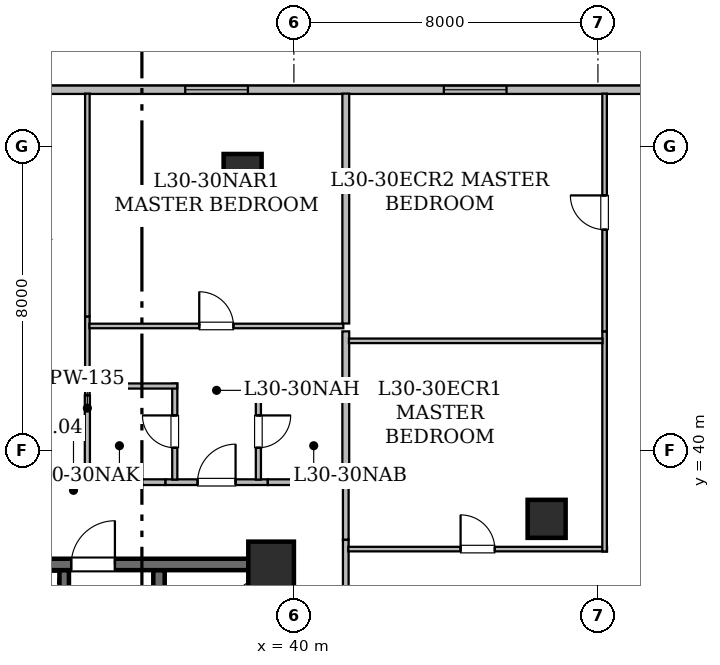
"""IFC4 building model, lengths in metres.
Left out: names, types, materials, properties, quantities, classifications, styles, units other than length and angle.
Written with IfcOpenShell. Run it as: python <this file> out.ifc"""

import sys

from ifc_helpers import new_model, si_unit, direction, frame, frame_2d, origin, origin_2d, place, context, subcontext, project, spatial, rectangle, hollow_rectangle, extrude, element, fill, save


model = new_model("IFC4")
c1 = context("Model", 3, precision=1e-05, world=origin(), true_north=direction((0.0, 1.0)))
c2 = subcontext(c1, "Body", "Model", "MODEL_VIEW")
j1 = project(units=[si_unit("LENGTHUNIT", "METRE"), si_unit("PLANEANGLEUNIT", "RADIAN")], contexts=[c1])
p1 = place(None, origin())
s1 = spatial("IfcSite", under=j1, at=p1, CompositionType="ELEMENT")
p2 = place(p1, origin())
s2 = spatial("IfcBuilding", under=s1, at=p2, CompositionType="ELEMENT")
p3 = place(p2, frame((0.0, 0.0, 120.15)))
s3 = spatial("IfcBuildingStorey", under=s2, at=p3, CompositionType="ELEMENT", Elevation=120.15)
p4 = place(p3, frame((39.4, 37.0, 0.0), z_axis=(0.0, 0.0, 1.0), x_axis=(1.0, 0.0, 0.0)))
e1 = element("IfcColumn", 1, at=p4, inside=s3, PredefinedType="COLUMN", context=c2, shape_type="SweptSolid", body=[
    extrude(hollow_rectangle(XDim=1.2, YDim=1.2, WallThickness=0.06, at=origin_2d()), origin(), (0.0, 0.0, 1.0), 3.65),
])
for number, where, z_axis, x_axis in (
    (2, (38.65, 47.3, 0.0), (0.0, 0.0, 1.0), (1.0, 0.0, 0.0)),
    (3, (46.65, 38.2, 0.0), (0.0, 0.0, 1.0), (1.0, 0.0, 0.0)),
):
    element("IfcColumn", number, at=place(p3, frame(where, z_axis=z_axis, x_axis=x_axis)), inside=s3, PredefinedType="COLUMN", context=c2, shape_type="SweptSolid", body=[
        extrude(hollow_rectangle(XDim=1.0, YDim=1.0, WallThickness=0.05, at=origin_2d()), origin(), (0.0, 0.0, 1.0), 3.65),
    ])
p5 = place(p3, frame((13.715, 49.49, 0.0), z_axis=(0.0, 0.0, 1.0), x_axis=(1.0, 0.0, 0.0)))
e4 = element("IfcWall", 4, at=p5, inside=s3, PredefinedType="STANDARD", context=c2, shape_type="SweptSolid", body=[
    extrude(rectangle(XDim=38.639, YDim=0.22, at=frame_2d((19.319, 0.0))), origin(), (0.0, 0.0, 1.0), 3.43),
])
p6 = place(p5, frame((16.16, 0.0, 0.85)))
e5 = element("IfcOpeningElement", 5, at=p6, cuts=e4, PredefinedType="OPENING", context=c2, shape_type="SweptSolid", body=[
    extrude(rectangle(XDim=1.65, YDim=1.55, at=frame_2d((0.825, 0.775))), frame((0.0, 0.12, 0.0), z_axis=(0.0, -1.0, 0.0), x_axis=(1.0, 0.0, 0.0)), (0.0, 0.0, 1.0), 0.24),
])
p7 = place(p5, frame((2.243, 0.0, 0.85)))
e6 = element("IfcOpeningElement", 6, at=p7, cuts=e4, PredefinedType="OPENING", context=c2, shape_type="SweptSolid", body=[
    extrude(rectangle(XDim=1.65, YDim=1.55, at=frame_2d((0.825, 0.775))), frame((0.0, 0.12, 0.0), z_axis=(0.0, -1.0, 0.0), x_axis=(1.0, 0.0, 0.0)), (0.0, 0.0, 1.0), 0.24),
])
p8 = place(p5, frame((11.03, 0.0, 0.85)))
e7 = element("IfcOpeningElement", 7, at=p8, cuts=e4, PredefinedType="OPENING", context=c2, shape_type="SweptSolid", body=[
    extrude(rectangle(XDim=1.65, YDim=1.55, at=frame_2d((0.825, 0.775))), frame((0.0, 0.12, 0.0), z_axis=(0.0, -1.0, 0.0), x_axis=(1.0, 0.0, 0.0)), (0.0, 0.0, 1.0), 0.24),
])
p9 = place(p5, frame((9.2, 0.0, 0.8)))
e8 = element("IfcOpeningElement", 8, at=p9, cuts=e4, PredefinedType="OPENING", context=c2, shape_type="SweptSolid", body=[
    extrude(rectangle(XDim=1.2, YDim=1.5, at=frame_2d((0.6, 0.75))), frame((0.0, 0.12, 0.0), z_axis=(0.0, -1.0, 0.0), x_axis=(1.0, 0.0, 0.0)), (0.0, 0.0, 1.0), 0.24),
])
p10 = place(p5, frame((6.175, 0.0, 0.85)))
e9 = element("IfcOpeningElement", 9, at=p10, cuts=e4, PredefinedType="OPENING", context=c2, shape_type="SweptSolid", body=[
    extrude(rectangle(XDim=1.65, YDim=1.55, at=frame_2d((0.825, 0.775))), frame((0.0, 0.12, 0.0), z_axis=(0.0, -1.0, 0.0), x_axis=(1.0, 0.0, 0.0)), (0.0, 0.0, 1.0), 0.24),
])
p11 = place(p5, frame((23.425, 0.0, 0.85)))
e10 = element("IfcOpeningElement", 10, at=p11, cuts=e4, PredefinedType="OPENING", context=c2, shape_type="SweptSolid", body=[
    extrude(rectangle(XDim=1.65, YDim=1.55, at=frame_2d((0.825, 0.775))), frame((0.0, 0.12, 0.0), z_axis=(0.0, -1.0, 0.0), x_axis=(1.0, 0.0, 0.0)), (0.0, 0.0, 1.0), 0.24),
])
p12 = place(p5, frame((30.23, 0.0, 0.85)))
e11 = element("IfcOpeningElement", 11, at=p12, cuts=e4, PredefinedType="OPENING", context=c2, shape_type="SweptSolid", body=[
    extrude(rectangle(XDim=1.65, YDim=1.55, at=frame_2d((0.825, 0.775))), frame((0.0, 0.12, 0.0), z_axis=(0.0, -1.0, 0.0), x_axis=(1.0, 0.0, 0.0)), (0.0, 0.0, 1.0), 0.24),
])
p13 = place(p5, frame((36.367, 0.0, 0.85)))
e12 = element("IfcOpeningElement", 12, at=p13, cuts=e4, PredefinedType="OPENING", context=c2, shape_type="SweptSolid", body=[
    extrude(rectangle(XDim=1.65, YDim=1.55, at=frame_2d((0.825, 0.775))), frame((0.0, 0.12, 0.0), z_axis=(0.0, -1.0, 0.0), x_axis=(1.0, 0.0, 0.0)), (0.0, 0.0, 1.0), 0.24),
])
p14 = place(p3, frame((29.0, 37.0, 0.0), z_axis=(0.0, 0.0, 1.0), x_axis=(1.0, 0.0, 0.0)))
e13 = element("IfcWall", 13, at=p14, inside=s3, PredefinedType="SHEAR", context=c2, shape_type="SweptSolid", body=[
    extrude(rectangle(XDim=10.4, YDim=0.3, at=frame_2d((5.2, 0.0))), origin(), (0.0, 0.0, 1.0), 3.43),
])
p15 = place(p14, frame((5.14, 0.0, 0.0)))
e14 = element("IfcOpeningElement", 14, at=p15, cuts=e13, PredefinedType="OPENING", context=c2, shape_type="SweptSolid", body=[
    extrude(rectangle(XDim=1.15, YDim=2.2, at=frame_2d((0.575, 1.1))), frame((0.0, 0.16, 0.0), z_axis=(0.0, -1.0, 0.0), x_axis=(1.0, 0.0, 0.0)), (0.0, 0.0, 1.0), 0.32),
])
p16 = place(p3, frame((39.4, 24.4, 0.0), z_axis=(0.0, 0.0, 1.0), x_axis=(0.0, 1.0, 0.0)))
e15 = element("IfcWall", 15, at=p16, inside=s3, PredefinedType="SHEAR", context=c2, shape_type="SweptSolid", body=[
    extrude(rectangle(XDim=12.6, YDim=0.3, at=frame_2d((6.3, 0.0))), origin(), (0.0, 0.0, 1.0), 3.43),
])
p17 = place(p3, frame((36.45, 31.35, 0.0), z_axis=(0.0, 0.0, 1.0), x_axis=(0.0, 1.0, 0.0)))
e16 = element("IfcWall", 16, at=p17, inside=s3, PredefinedType="SHEAR", context=c2, shape_type="SweptSolid", body=[
    extrude(rectangle(XDim=5.496, YDim=0.3, at=frame_2d((2.748, 0.0))), origin(), (0.0, 0.0, 1.0), 3.43),
])
p18 = place(p3, frame((33.955, 34.025, 0.0), z_axis=(0.0, 0.0, 1.0), x_axis=(0.0, 1.0, 0.0)))
e17 = element("IfcWall", 17, at=p18, inside=s3, PredefinedType="SHEAR", context=c2, shape_type="SweptSolid", body=[
    extrude(rectangle(XDim=2.821, YDim=0.25, at=frame_2d((1.411, 0.0))), origin(), (0.0, 0.0, 1.0), 3.43),
])
p19 = place(p3, frame((26.9, 39.165, 0.0), z_axis=(0.0, 0.0, 1.0), x_axis=(1.0, 0.0, 0.0)))
e18 = element("IfcWall", 18, at=p19, inside=s3, PredefinedType="STANDARD", context=c2, shape_type="SweptSolid", body=[
    extrude(rectangle(XDim=7.914, YDim=0.15, at=frame_2d((3.957, 0.0))), origin(), (0.0, 0.0, 1.0), 2.647),
])
p20 = place(p19, frame((3.486, 0.0, 0.0)))
e19 = element("IfcOpeningElement", 19, at=p20, cuts=e18, PredefinedType="OPENING", context=c2, shape_type="SweptSolid", body=[
    extrude(rectangle(XDim=0.9, YDim=2.1, at=frame_2d((0.45, 1.05))), frame((0.0, 0.085, 0.0), z_axis=(0.0, -1.0, 0.0), x_axis=(1.0, 0.0, 0.0)), (0.0, 0.0, 1.0), 0.17),
])
p21 = place(p3, frame((36.616, 39.165, 0.0), z_axis=(0.0, 0.0, 1.0), x_axis=(1.0, 0.0, 0.0)))
e20 = element("IfcWall", 20, at=p21, inside=s3, PredefinedType="STANDARD", context=c2, shape_type="SweptSolid", body=[
    extrude(rectangle(XDim=2.698, YDim=0.15, at=frame_2d((1.349, 0.0))), origin(), (0.0, 0.0, 1.0), 2.647),
])
p22 = place(p21, frame((0.849, 0.0, 0.0)))
e21 = element("IfcOpeningElement", 21, at=p22, cuts=e20, PredefinedType="OPENING", context=c2, shape_type="SweptSolid", body=[
    extrude(rectangle(XDim=1.0, YDim=2.15, at=frame_2d((0.5, 1.075))), frame((0.0, 0.085, 0.0), z_axis=(0.0, -1.0, 0.0), x_axis=(1.0, 0.0, 0.0)), (0.0, 0.0, 1.0), 0.17),
])
p23 = place(p3, frame((39.314, 39.165, 0.0), z_axis=(0.0, 0.0, 1.0), x_axis=(1.0, 0.0, 0.0)))
e22 = element("IfcWall", 22, at=p23, inside=s3, PredefinedType="STANDARD", context=c2, shape_type="SweptSolid", body=[
    extrude(rectangle(XDim=1.986, YDim=0.15, at=frame_2d((0.993, 0.0))), origin(), (0.0, 0.0, 1.0), 2.647),
])
p24 = place(p3, frame((34.814, 39.165, 0.0), z_axis=(0.0, 0.0, 1.0), x_axis=(1.0, 0.0, 0.0)))
e23 = element("IfcWall", 23, at=p24, inside=s3, PredefinedType="STANDARD", context=c2, shape_type="SweptSolid", body=[
    extrude(rectangle(XDim=1.802, YDim=0.15, at=frame_2d((0.901, 0.0))), origin(), (0.0, 0.0, 1.0), 3.43),
])
p25 = place(p3, frame((41.365, 37.653, 0.0), z_axis=(0.0, 0.0, 1.0), x_axis=(0.0, -1.0, 0.0)))
e24 = element("IfcWall", 24, at=p25, inside=s3, PredefinedType="STANDARD", context=c2, shape_type="SweptSolid", body=[
    extrude(rectangle(XDim=2.078, YDim=0.15, at=frame_2d((1.039, 0.0))), origin(), (0.0, 0.0, 1.0), 2.647),
])
p26 = place(p3, frame((41.365, 39.1, 0.0), z_axis=(0.0, 0.0, 1.0), x_axis=(0.0, -1.0, 0.0)))
e25 = element("IfcWall", 25, at=p26, inside=s3, PredefinedType="STANDARD", context=c2, shape_type="SweptSolid", body=[
    extrude(rectangle(XDim=1.447, YDim=0.15, at=frame_2d((0.724, 0.0))), origin(), (0.0, 0.0, 1.0), 3.43),
])
p27 = place(p3, frame((34.565, 43.524, 0.0), z_axis=(0.0, 0.0, 1.0), x_axis=(0.0, -1.0, 0.0)))
e26 = element("IfcWall", 26, at=p27, inside=s3, PredefinedType="PARTITIONING", context=c2, shape_type="SweptSolid", body=[
    extrude(rectangle(XDim=2.078, YDim=0.12, at=frame_2d((1.039, 0.0))), origin(), (0.0, 0.0, 1.0), 3.43),
])
p28 = place(p3, frame((34.565, 41.446, 0.0), z_axis=(0.0, 0.0, 1.0), x_axis=(0.0, -1.0, 0.0)))
e27 = element("IfcWall", 27, at=p28, inside=s3, PredefinedType="PARTITIONING", context=c2, shape_type="SweptSolid", body=[
    extrude(rectangle(XDim=2.214, YDim=0.135, at=frame_2d((1.107, 0.0))), origin(), (0.0, 0.0, 1.0), 3.43),
])
p29 = place(p3, frame((34.565, 49.388, 0.0), z_axis=(0.0, 0.0, 1.0), x_axis=(0.0, -1.0, 0.0)))
e28 = element("IfcWall", 28, at=p29, inside=s3, PredefinedType="PARTITIONING", context=c2, shape_type="SweptSolid", body=[
    extrude(rectangle(XDim=5.864, YDim=0.12, at=frame_2d((2.932, 0.0))), origin(), (0.0, 0.0, 1.0), 2.876),
])
p30 = place(p3, frame((41.3, 41.695, 0.0), z_axis=(0.0, 0.0, 1.0), x_axis=(-1.0, 0.0, 0.0)))
e29 = element("IfcWall", 29, at=p30, inside=s3, PredefinedType="PARTITIONING", context=c2, shape_type="SweptSolid", body=[
    extrude(rectangle(XDim=2.3, YDim=0.135, at=frame_2d((1.15, 0.0))), origin(), (0.0, 0.0, 1.0), 2.647),
])
p31 = place(p3, frame((39.065, 41.76, 0.0), z_axis=(0.0, 0.0, 1.0), x_axis=(0.0, -1.0, 0.0)))
e30 = element("IfcWall", 30, at=p31, inside=s3, PredefinedType="PARTITIONING", context=c2, shape_type="SweptSolid", body=[
    extrude(rectangle(XDim=2.528, YDim=0.135, at=frame_2d((1.264, 0.0))), origin(), (0.0, 0.0, 1.0), 2.647),
])
p32 = place(p31, frame((0.839, 0.0, 0.0)))
e31 = element("IfcOpeningElement", 31, at=p32, cuts=e30, PredefinedType="OPENING", context=c2, shape_type="SweptSolid", body=[
    extrude(rectangle(XDim=0.85, YDim=2.1, at=frame_2d((0.425, 1.05))), frame((0.0, 0.077, 0.0), z_axis=(0.0, -1.0, 0.0), x_axis=(1.0, 0.0, 0.0)), (0.0, 0.0, 1.0), 0.155),
])
p33 = place(p3, frame((36.865, 39.232, 0.0), z_axis=(0.0, 0.0, 1.0), x_axis=(0.0, 1.0, 0.0)))
e32 = element("IfcWall", 32, at=p33, inside=s3, PredefinedType="PARTITIONING", context=c2, shape_type="SweptSolid", body=[
    extrude(rectangle(XDim=2.528, YDim=0.135, at=frame_2d((1.264, 0.0))), origin(), (0.0, 0.0, 1.0), 3.43),
])
p34 = place(p33, frame((0.839, 0.0, 0.0)))
e33 = element("IfcOpeningElement", 33, at=p34, cuts=e32, PredefinedType="OPENING", context=c2, shape_type="SweptSolid", body=[
    extrude(rectangle(XDim=0.85, YDim=2.1, at=frame_2d((0.425, 1.05))), frame((0.0, 0.077, 0.0), z_axis=(0.0, -1.0, 0.0), x_axis=(1.0, 0.0, 0.0)), (0.0, 0.0, 1.0), 0.155),
])
p35 = place(p3, frame((36.93, 41.695, 0.0), z_axis=(0.0, 0.0, 1.0), x_axis=(-1.0, 0.0, 0.0)))
e34 = element("IfcWall", 34, at=p35, inside=s3, PredefinedType="PARTITIONING", context=c2, shape_type="SweptSolid", body=[
    extrude(rectangle(XDim=2.311, YDim=0.135, at=frame_2d((1.156, 0.0))), origin(), (0.0, 0.0, 1.0), 3.43),
])
p36 = place(p3, frame((34.619, 43.275, 0.0), z_axis=(0.0, 0.0, 1.0), x_axis=(1.0, 0.0, 0.0)))
e35 = element("IfcWall", 35, at=p36, inside=s3, PredefinedType="PARTITIONING", context=c2, shape_type="SweptSolid", body=[
    extrude(rectangle(XDim=6.681, YDim=0.12, at=frame_2d((3.341, 0.0))), origin(), (0.0, 0.0, 1.0), 2.647),
])
p37 = place(p36, frame((2.89, 0.0, 0.0)))
e36 = element("IfcOpeningElement", 36, at=p37, cuts=e35, PredefinedType="OPENING", context=c2, shape_type="SweptSolid", body=[
    extrude(rectangle(XDim=0.9, YDim=2.1, at=frame_2d((0.45, 1.05))), frame((0.0, 0.07, 0.0), z_axis=(0.0, -1.0, 0.0), x_axis=(1.0, 0.0, 0.0)), (0.0, 0.0, 1.0), 0.14),
])
p38 = place(p3, frame((41.365, 43.133, 0.0), z_axis=(0.0, 0.0, 1.0), x_axis=(0.0, -1.0, 0.0)))
e37 = element("IfcWall", 37, at=p38, inside=s3, PredefinedType="STANDARD", context=c2, shape_type="SweptSolid", body=[
    extrude(rectangle(XDim=1.373, YDim=0.18, at=frame_2d((0.687, 0.0))), origin(), (0.0, 0.0, 1.0), 3.43),
])
p39 = place(p3, frame((41.365, 41.63, 0.0), z_axis=(0.0, 0.0, 1.0), x_axis=(0.0, -1.0, 0.0)))
e38 = element("IfcWall", 38, at=p39, inside=s3, PredefinedType="STANDARD", context=c2, shape_type="SweptSolid", body=[
    extrude(rectangle(XDim=2.4, YDim=0.18, at=frame_2d((1.2, 0.0))), origin(), (0.0, 0.0, 1.0), 3.43),
])
p40 = place(p3, frame((41.365, 49.388, 0.0), z_axis=(0.0, 0.0, 1.0), x_axis=(0.0, -1.0, 0.0)))
e39 = element("IfcWall", 39, at=p40, inside=s3, PredefinedType="STANDARD", context=c2, shape_type="SweptSolid", body=[
    extrude(rectangle(XDim=6.048, YDim=0.18, at=frame_2d((3.024, 0.0))), origin(), (0.0, 0.0, 1.0), 2.876),
])
p41 = place(p3, frame((41.432, 37.404, 0.0), z_axis=(0.0, 0.0, 1.0), x_axis=(1.0, 0.0, 0.0)))
e40 = element("IfcWall", 40, at=p41, inside=s3, PredefinedType="PARTITIONING", context=c2, shape_type="SweptSolid", body=[
    extrude(rectangle(XDim=6.808, YDim=0.12, at=frame_2d((3.404, 0.0))), origin(), (0.0, 0.0, 1.0), 2.647),
])
p42 = place(p41, frame((2.954, 0.0, 0.0)))
e41 = element("IfcOpeningElement", 41, at=p42, cuts=e40, PredefinedType="OPENING", context=c2, shape_type="SweptSolid", body=[
    extrude(rectangle(XDim=0.9, YDim=2.1, at=frame_2d((0.45, 1.05))), frame((0.0, 0.07, 0.0), z_axis=(0.0, -1.0, 0.0), x_axis=(1.0, 0.0, 0.0)), (0.0, 0.0, 1.0), 0.14),
])
p43 = place(p3, frame((48.175, 37.339, 0.0), z_axis=(0.0, 0.0, 1.0), x_axis=(0.0, 1.0, 0.0)))
e42 = element("IfcWall", 42, at=p43, inside=s3, PredefinedType="PARTITIONING", context=c2, shape_type="SweptSolid", body=[
    extrude(rectangle(XDim=5.794, YDim=0.12, at=frame_2d((2.897, 0.0))), origin(), (0.0, 0.0, 1.0), 2.647),
])
p44 = place(p3, frame((48.175, 43.133, 0.0), z_axis=(0.0, 0.0, 1.0), x_axis=(0.0, 1.0, 0.0)))
e43 = element("IfcWall", 43, at=p44, inside=s3, PredefinedType="PARTITIONING", context=c2, shape_type="SweptSolid", body=[
    extrude(rectangle(XDim=6.255, YDim=0.12, at=frame_2d((3.127, 0.0))), origin(), (0.0, 0.0, 1.0), 2.647),
])
p45 = place(p44, frame((2.677, 0.0, 0.0)))
e44 = element("IfcOpeningElement", 44, at=p45, cuts=e43, PredefinedType="OPENING", context=c2, shape_type="SweptSolid", body=[
    extrude(rectangle(XDim=0.9, YDim=2.1, at=frame_2d((0.45, 1.05))), frame((0.0, 0.07, 0.0), z_axis=(0.0, -1.0, 0.0), x_axis=(1.0, 0.0, 0.0)), (0.0, 0.0, 1.0), 0.14),
])
p46 = place(p3, frame((41.447, 42.884, 0.0), z_axis=(0.0, 0.0, 1.0), x_axis=(1.0, 0.0, 0.0)))
e45 = element("IfcWall", 45, at=p46, inside=s3, PredefinedType="PARTITIONING", context=c2, shape_type="SweptSolid", body=[
    extrude(rectangle(XDim=6.674, YDim=0.12, at=frame_2d((3.337, 0.0))), origin(), (0.0, 0.0, 1.0), 3.43),
])
p47 = place(p11, origin())
e46 = element("IfcWindow", 46, at=p47, inside=s3, PartitioningType="SINGLE_PANEL", PredefinedType="WINDOW", context=c2, shape_type="SweptSolid", body=[
    extrude(rectangle(XDim=1.65, YDim=1.55, at=frame_2d((0.825, 0.775))), frame((0.0, 0.03, 0.0), z_axis=(0.0, -1.0, 0.0), x_axis=(1.0, 0.0, 0.0)), (0.0, 0.0, 1.0), 0.06),
])
fill(e10, e46)
p48 = place(p12, origin())
e47 = element("IfcWindow", 47, at=p48, inside=s3, PartitioningType="SINGLE_PANEL", PredefinedType="WINDOW", context=c2, shape_type="SweptSolid", body=[
    extrude(rectangle(XDim=1.65, YDim=1.55, at=frame_2d((0.825, 0.775))), frame((0.0, 0.03, 0.0), z_axis=(0.0, -1.0, 0.0), x_axis=(1.0, 0.0, 0.0)), (0.0, 0.0, 1.0), 0.06),
])
fill(e11, e47)
p49 = place(p15, origin())
e48 = element("IfcDoor", 48, at=p49, inside=s3, OperationType="SINGLE_SWING_RIGHT", PredefinedType="DOOR", context=c2, shape_type="SweptSolid", body=[
    extrude(rectangle(XDim=1.15, YDim=2.2, at=frame_2d((0.575, 1.1))), frame((0.0, 0.025, 0.0), z_axis=(0.0, -1.0, 0.0), x_axis=(1.0, 0.0, 0.0)), (0.0, 0.0, 1.0), 0.05),
])
fill(e14, e48)
p50 = place(p22, origin())
e49 = element("IfcDoor", 49, at=p50, inside=s3, OperationType="SINGLE_SWING_RIGHT", PredefinedType="DOOR", context=c2, shape_type="SweptSolid", body=[
    extrude(rectangle(XDim=1.0, YDim=2.15, at=frame_2d((0.5, 1.075))), frame((0.0, 0.025, 0.0), z_axis=(0.0, -1.0, 0.0), x_axis=(1.0, 0.0, 0.0)), (0.0, 0.0, 1.0), 0.05),
])
fill(e21, e49)
p51 = place(p32, origin())
e50 = element("IfcDoor", 50, at=p51, inside=s3, OperationType="SINGLE_SWING_LEFT", PredefinedType="DOOR", context=c2, shape_type="SweptSolid", body=[
    extrude(rectangle(XDim=0.85, YDim=2.1, at=frame_2d((0.425, 1.05))), frame((0.0, 0.025, 0.0), z_axis=(0.0, -1.0, 0.0), x_axis=(1.0, 0.0, 0.0)), (0.0, 0.0, 1.0), 0.05),
])
fill(e31, e50)
p52 = place(p34, origin())
e51 = element("IfcDoor", 51, at=p52, inside=s3, OperationType="SINGLE_SWING_RIGHT", PredefinedType="DOOR", context=c2, shape_type="SweptSolid", body=[
    extrude(rectangle(XDim=0.85, YDim=2.1, at=frame_2d((0.425, 1.05))), frame((0.0, 0.025, 0.0), z_axis=(0.0, -1.0, 0.0), x_axis=(1.0, 0.0, 0.0)), (0.0, 0.0, 1.0), 0.05),
])
fill(e33, e51)
p53 = place(p37, origin())
e52 = element("IfcDoor", 52, at=p53, inside=s3, OperationType="SINGLE_SWING_LEFT", PredefinedType="DOOR", context=c2, shape_type="SweptSolid", body=[
    extrude(rectangle(XDim=0.9, YDim=2.1, at=frame_2d((0.45, 1.05))), frame((0.0, 0.025, 0.0), z_axis=(0.0, -1.0, 0.0), x_axis=(1.0, 0.0, 0.0)), (0.0, 0.0, 1.0), 0.05),
])
fill(e36, e52)
p54 = place(p42, origin())
e53 = element("IfcDoor", 53, at=p54, inside=s3, OperationType="SINGLE_SWING_LEFT", PredefinedType="DOOR", context=c2, shape_type="SweptSolid", body=[
    extrude(rectangle(XDim=0.9, YDim=2.1, at=frame_2d((0.45, 1.05))), frame((0.0, 0.025, 0.0), z_axis=(0.0, -1.0, 0.0), x_axis=(1.0, 0.0, 0.0)), (0.0, 0.0, 1.0), 0.05),
])
fill(e41, e53)
p55 = place(p45, origin())
e54 = element("IfcDoor", 54, at=p55, inside=s3, OperationType="SINGLE_SWING_RIGHT", PredefinedType="DOOR", context=c2, shape_type="SweptSolid", body=[
    extrude(rectangle(XDim=0.9, YDim=2.1, at=frame_2d((0.45, 1.05))), frame((0.0, 0.025, 0.0), z_axis=(0.0, -1.0, 0.0), x_axis=(1.0, 0.0, 0.0)), (0.0, 0.0, 1.0), 0.05),
])
fill(e44, e54)
save(model, sys.argv[1])
